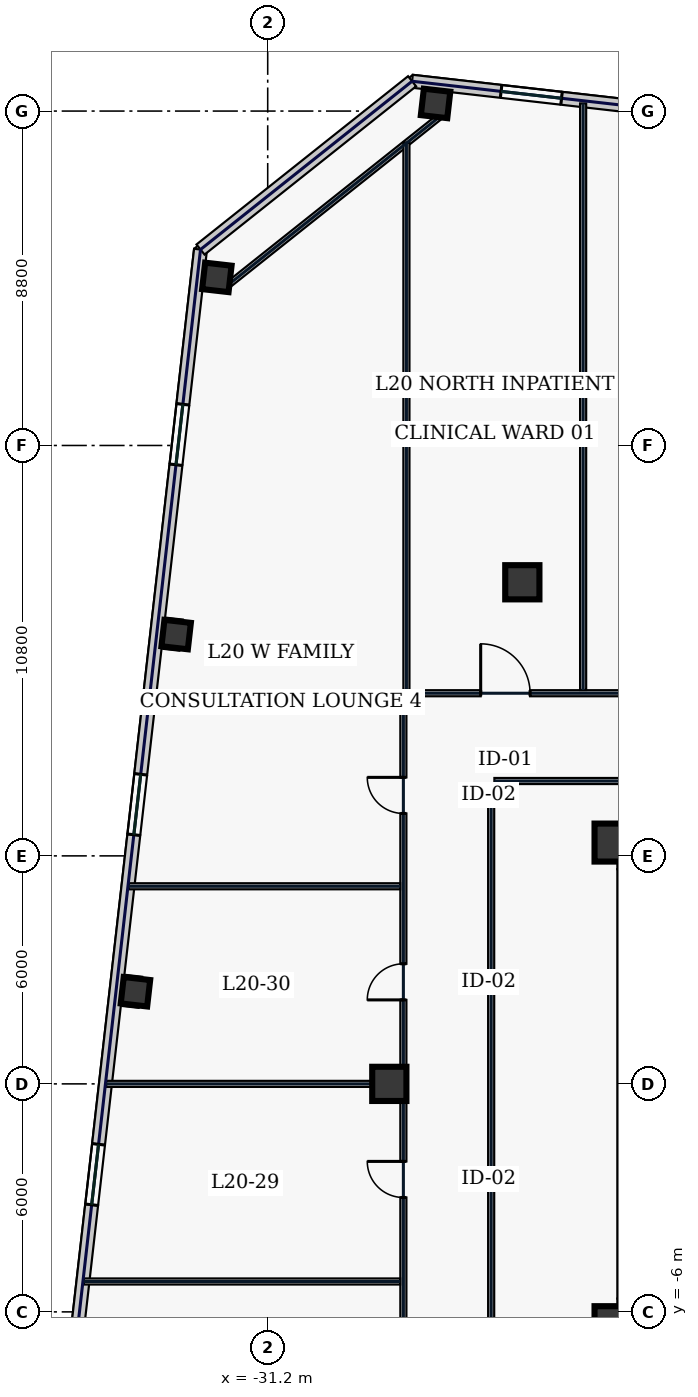
"""IFC4 building model, lengths in metres.
Left out: names, types, materials, properties, quantities, classifications, styles, units other than length and angle.
Written with IfcOpenShell. Run it as: python <this file> out.ifc"""

import sys

from ifc_helpers import new_model, si_unit, direction, frame, frame_2d, origin, origin_2d, place, context, subcontext, project, spatial, rectangle, hollow_rectangle, extrude, element, fill, save


model = new_model("IFC4")
c1 = context("Model", 3, precision=1e-05, world=origin(), true_north=direction((0.0, 1.0)))
c2 = subcontext(c1, "Body", "Model", "MODEL_VIEW")
j1 = project(units=[si_unit("LENGTHUNIT", "METRE"), si_unit("PLANEANGLEUNIT", "RADIAN")], contexts=[c1])
p1 = place(None, origin())
s1 = spatial("IfcSite", under=j1, at=p1, CompositionType="ELEMENT")
p2 = place(p1, origin())
s2 = spatial("IfcBuilding", under=s1, at=p2, CompositionType="ELEMENT")
p3 = place(p2, frame((0.0, 0.0, 93.4)))
s3 = spatial("IfcBuildingStorey", under=s2, at=p3, CompositionType="ELEMENT", Elevation=93.4)
for number, where, z_axis, x_axis in (
    (1, (-22.0, 6.0, 0.0), (0.0, 0.0, 1.0), (1.0, 0.0, 0.0)),
    (2, (-22.0, -6.0, 0.0), (0.0, 0.0, 1.0), (1.0, 0.0, 0.0)),
):
    element("IfcWall", number, at=place(p3, frame(where, z_axis=z_axis, x_axis=x_axis)), inside=s3, PredefinedType="SHEAR", context=c2, shape_type="SweptSolid", body=[
        extrude(rectangle(XDim=11.55, YDim=0.7, at=frame_2d((5.775, 0.0))), origin(), (0.0, 0.0, 1.0), 3.74),
    ])
p4 = place(p3, frame((-21.6, -5.65, 0.0), z_axis=(0.0, 0.0, 1.0), x_axis=(0.0, 1.0, 0.0)))
e3 = element("IfcWall", 3, at=p4, inside=s3, PredefinedType="SHEAR", context=c2, shape_type="SweptSolid", body=[
    extrude(rectangle(XDim=11.3, YDim=0.8, at=frame_2d((5.65, 0.0))), origin(), (0.0, 0.0, 1.0), 3.74),
])
for number, where, z_axis, x_axis in (
    (4, (-22.1, -6.35, 0.0), (0.0, 0.0, 1.0), (1.0, 0.0, 0.0)),
    (5, (-22.1, 6.35, 0.0), (0.0, 0.0, 1.0), (1.0, 0.0, 0.0)),
):
    element("IfcColumn", number, at=place(p3, frame(where, z_axis=z_axis, x_axis=x_axis)), inside=s3, PredefinedType="COLUMN", context=c2, shape_type="SweptSolid", body=[
        extrude(hollow_rectangle(XDim=1.0, YDim=1.0, WallThickness=0.045, at=origin_2d()), origin(), (0.0, 0.0, 1.0), 3.74),
    ])
for number, where, z_axis, x_axis in (
    (6, (-24.5, 13.2, 0.0), (0.0, 0.0, 1.0), (1.0, 0.0, 0.0)),
    (7, (-28.0, 0.0, 0.0), (0.0, 0.0, 1.0), (1.0, 0.0, 0.0)),
):
    element("IfcColumn", number, at=place(p3, frame(where, z_axis=z_axis, x_axis=x_axis)), inside=s3, PredefinedType="COLUMN", context=c2, shape_type="SweptSolid", body=[
        extrude(hollow_rectangle(XDim=0.9, YDim=0.9, WallThickness=0.04, at=origin_2d()), origin(), (0.0, 0.0, 1.0), 3.74),
    ])
for number, where, z_axis, x_axis in (
    (8, (-26.783, 25.801, 0.0), (0.0, 0.0, 1.0), (0.994, -0.113, 0.0)),
    (9, (-32.538, 21.223, 0.0), (0.0, 0.0, 1.0), (0.994, -0.113, 0.0)),
    (10, (-33.609, 11.824, 0.0), (0.0, 0.0, 1.0), (0.994, -0.113, 0.0)),
    (11, (-34.68, 2.425, 0.0), (0.0, 0.0, 1.0), (0.994, -0.113, 0.0)),
):
    element("IfcColumn", number, at=place(p3, frame(where, z_axis=z_axis, x_axis=x_axis)), inside=s3, PredefinedType="COLUMN", context=c2, shape_type="SweptSolid", body=[
        extrude(hollow_rectangle(XDim=0.7, YDim=0.7, WallThickness=0.032, at=origin_2d()), origin(), (0.0, 0.0, 1.0), 3.74),
    ])
p5 = place(p3, frame((-6.314, 23.982, 0.0), z_axis=(0.0, 0.0, 1.0), x_axis=(-0.993571362037, 0.113207546299, 0.0)))
e12 = element("IfcWall", 12, at=p5, inside=s3, PredefinedType="STANDARD", context=c2, shape_type="SweptSolid", body=[
    extrude(rectangle(XDim=21.223, YDim=0.34, at=frame_2d((10.611, 0.0))), origin(), (0.0, 0.0, 1.0), 3.74),
])
p6 = place(p5, frame((17.265, 0.0, 0.22)))
e13 = element("IfcOpeningElement", 13, at=p6, cuts=e12, PredefinedType="OPENING", context=c2, shape_type="SweptSolid", body=[
    extrude(rectangle(XDim=1.6, YDim=1.2, at=frame_2d((0.8, 0.6))), frame((0.0, 0.18, 0.0), z_axis=(0.0, -1.0, 0.0), x_axis=(1.0, 0.0, 0.0)), (0.0, 0.0, 1.0), 0.36),
])
p7 = place(p5, frame((12.794, 0.0, 0.67)))
e14 = element("IfcOpeningElement", 14, at=p7, cuts=e12, PredefinedType="OPENING", context=c2, shape_type="SweptSolid", body=[
    extrude(rectangle(XDim=2.1, YDim=2.2, at=frame_2d((1.05, 1.1))), frame((0.0, 0.18, 0.0), z_axis=(0.0, -1.0, 0.0), x_axis=(1.0, 0.0, 0.0)), (0.0, 0.0, 1.0), 0.36),
])
p8 = place(p5, frame((4.866, 0.0, 0.67)))
e15 = element("IfcOpeningElement", 15, at=p8, cuts=e12, PredefinedType="OPENING", context=c2, shape_type="SweptSolid", body=[
    extrude(rectangle(XDim=0.85, YDim=1.85, at=frame_2d((0.425, 0.925))), frame((0.0, 0.18, 0.0), z_axis=(0.0, -1.0, 0.0), x_axis=(1.0, 0.0, 0.0)), (0.0, 0.0, 1.0), 0.36),
])
p9 = place(p3, frame((-32.968, 21.957, 0.0), z_axis=(0.0, 0.0, 1.0), x_axis=(-0.113201605824, -0.993572038877, 0.0)))
e16 = element("IfcWall", 16, at=p9, inside=s3, PredefinedType="STANDARD", context=c2, shape_type="SweptSolid", body=[
    extrude(rectangle(XDim=39.2, YDim=0.34, at=frame_2d((19.6, 0.0))), origin(), (0.0, 0.0, 1.0), 3.74),
])
p10 = place(p9, frame((4.1, 0.0, 0.58)))
e17 = element("IfcOpeningElement", 17, at=p10, cuts=e16, PredefinedType="OPENING", context=c2, shape_type="SweptSolid", body=[
    extrude(rectangle(XDim=1.6, YDim=2.3, at=frame_2d((0.8, 1.15))), frame((0.0, 0.18, 0.0), z_axis=(0.0, -1.0, 0.0), x_axis=(1.0, 0.0, 0.0)), (0.0, 0.0, 1.0), 0.36),
])
p11 = place(p9, frame((13.9, 0.0, 0.58)))
e18 = element("IfcOpeningElement", 18, at=p11, cuts=e16, PredefinedType="OPENING", context=c2, shape_type="SweptSolid", body=[
    extrude(rectangle(XDim=1.6, YDim=2.3, at=frame_2d((0.8, 1.15))), frame((0.0, 0.18, 0.0), z_axis=(0.0, -1.0, 0.0), x_axis=(1.0, 0.0, 0.0)), (0.0, 0.0, 1.0), 0.36),
])
p12 = place(p9, frame((23.7, 0.0, 0.58)))
e19 = element("IfcOpeningElement", 19, at=p12, cuts=e16, PredefinedType="OPENING", context=c2, shape_type="SweptSolid", body=[
    extrude(rectangle(XDim=1.6, YDim=2.3, at=frame_2d((0.8, 1.15))), frame((0.0, 0.18, 0.0), z_axis=(0.0, -1.0, 0.0), x_axis=(1.0, 0.0, 0.0)), (0.0, 0.0, 1.0), 0.36),
])
p13 = place(p9, frame((33.5, 0.0, 0.58)))
e20 = element("IfcOpeningElement", 20, at=p13, cuts=e16, PredefinedType="OPENING", context=c2, shape_type="SweptSolid", body=[
    extrude(rectangle(XDim=1.6, YDim=2.3, at=frame_2d((0.8, 1.15))), frame((0.0, 0.18, 0.0), z_axis=(0.0, -1.0, 0.0), x_axis=(1.0, 0.0, 0.0)), (0.0, 0.0, 1.0), 0.36),
])
p14 = place(p3, frame((-27.401, 26.385, 0.0), z_axis=(0.0, 0.0, 1.0), x_axis=(-0.78261359446, -0.622507800567, 0.0)))
e21 = element("IfcWall", 21, at=p14, inside=s3, PredefinedType="STANDARD", context=c2, shape_type="SweptSolid", body=[
    extrude(rectangle(XDim=7.114, YDim=0.34, at=frame_2d((3.557, 0.0))), origin(), (0.0, 0.0, 1.0), 3.74),
])
p15 = place(p3, frame((-26.571, 25.535, 0.0), z_axis=(0.0, 0.0, 1.0), x_axis=(-0.782617962887, -0.622502308564, 0.0)))
e22 = element("IfcWall", 22, at=p15, inside=s3, PredefinedType="PARTITIONING", context=c2, shape_type="SweptSolid", body=[
    extrude(rectangle(XDim=7.354, YDim=0.16, at=frame_2d((3.677, 0.0))), origin(), (0.0, 0.0, 1.0), 3.74),
])
p16 = place(p3, frame((-27.63, -10.015, 0.0), z_axis=(0.0, 0.0, 1.0), x_axis=(0.0, 1.0, 0.0)))
e23 = element("IfcWall", 23, at=p16, inside=s3, PredefinedType="PARTITIONING", context=c2, shape_type="SweptSolid", body=[
    extrude(rectangle(XDim=20.13, YDim=0.16, at=frame_2d((10.065, 0.0))), origin(), (0.0, 0.0, 1.0), 3.74),
])
p17 = place(p16, frame((2.169, 0.0, 0.0)))
e24 = element("IfcOpeningElement", 24, at=p17, cuts=e23, PredefinedType="OPENING", context=c2, shape_type="SweptSolid", body=[
    extrude(rectangle(XDim=0.95, YDim=2.2, at=frame_2d((0.475, 1.1))), frame((0.0, 0.09, 0.0), z_axis=(0.0, -1.0, 0.0), x_axis=(1.0, 0.0, 0.0)), (0.0, 0.0, 1.0), 0.18),
])
p18 = place(p16, frame((7.025, 0.0, 0.0)))
e25 = element("IfcOpeningElement", 25, at=p18, cuts=e23, PredefinedType="OPENING", context=c2, shape_type="SweptSolid", body=[
    extrude(rectangle(XDim=0.95, YDim=2.2, at=frame_2d((0.475, 1.1))), frame((0.0, 0.09, 0.0), z_axis=(0.0, -1.0, 0.0), x_axis=(1.0, 0.0, 0.0)), (0.0, 0.0, 1.0), 0.18),
])
p19 = place(p16, frame((12.225, 0.0, 0.0)))
e26 = element("IfcOpeningElement", 26, at=p19, cuts=e23, PredefinedType="OPENING", context=c2, shape_type="SweptSolid", body=[
    extrude(rectangle(XDim=0.95, YDim=2.2, at=frame_2d((0.475, 1.1))), frame((0.0, 0.09, 0.0), z_axis=(0.0, -1.0, 0.0), x_axis=(1.0, 0.0, 0.0)), (0.0, 0.0, 1.0), 0.18),
])
p20 = place(p16, frame((17.131, 0.0, 0.0)))
e27 = element("IfcOpeningElement", 27, at=p20, cuts=e23, PredefinedType="OPENING", context=c2, shape_type="SweptSolid", body=[
    extrude(rectangle(XDim=0.95, YDim=2.2, at=frame_2d((0.475, 1.1))), frame((0.0, 0.09, 0.0), z_axis=(0.0, -1.0, 0.0), x_axis=(1.0, 0.0, 0.0)), (0.0, 0.0, 1.0), 0.18),
])
p21 = place(p3, frame((-27.465, 10.28, 0.0), z_axis=(0.0, 0.0, 1.0), x_axis=(1.0, 0.0, 0.0)))
e28 = element("IfcWall", 28, at=p21, inside=s3, PredefinedType="PARTITIONING", context=c2, shape_type="SweptSolid", body=[
    extrude(rectangle(XDim=54.93, YDim=0.16, at=frame_2d((27.465, 0.0))), origin(), (0.0, 0.0, 1.0), 3.74),
])
p22 = place(p21, frame((1.869, 0.0, 0.0)))
e29 = element("IfcOpeningElement", 29, at=p22, cuts=e28, PredefinedType="OPENING", context=c2, shape_type="SweptSolid", body=[
    extrude(rectangle(XDim=1.3, YDim=2.2, at=frame_2d((0.65, 1.1))), frame((0.0, 0.09, 0.0), z_axis=(0.0, -1.0, 0.0), x_axis=(1.0, 0.0, 0.0)), (0.0, 0.0, 1.0), 0.18),
])
p23 = place(p21, frame((8.08, 0.0, 0.0)))
e30 = element("IfcOpeningElement", 30, at=p23, cuts=e28, PredefinedType="OPENING", context=c2, shape_type="SweptSolid", body=[
    extrude(rectangle(XDim=0.95, YDim=2.2, at=frame_2d((0.475, 1.1))), frame((0.0, 0.09, 0.0), z_axis=(0.0, -1.0, 0.0), x_axis=(1.0, 0.0, 0.0)), (0.0, 0.0, 1.0), 0.18),
])
p24 = place(p21, frame((14.555, 0.0, 0.0)))
e31 = element("IfcOpeningElement", 31, at=p24, cuts=e28, PredefinedType="OPENING", context=c2, shape_type="SweptSolid", body=[
    extrude(rectangle(XDim=1.3, YDim=2.2, at=frame_2d((0.65, 1.1))), frame((0.0, 0.09, 0.0), z_axis=(0.0, -1.0, 0.0), x_axis=(1.0, 0.0, 0.0)), (0.0, 0.0, 1.0), 0.18),
])
p25 = place(p21, frame((21.2, 0.0, 0.0)))
e32 = element("IfcOpeningElement", 32, at=p25, cuts=e28, PredefinedType="OPENING", context=c2, shape_type="SweptSolid", body=[
    extrude(rectangle(XDim=0.95, YDim=2.2, at=frame_2d((0.475, 1.1))), frame((0.0, 0.09, 0.0), z_axis=(0.0, -1.0, 0.0), x_axis=(1.0, 0.0, 0.0)), (0.0, 0.0, 1.0), 0.18),
])
p26 = place(p21, frame((28.2, 0.0, 0.0)))
e33 = element("IfcOpeningElement", 33, at=p26, cuts=e28, PredefinedType="OPENING", context=c2, shape_type="SweptSolid", body=[
    extrude(rectangle(XDim=1.05, YDim=2.2, at=frame_2d((0.525, 1.1))), frame((0.0, 0.09, 0.0), z_axis=(0.0, -1.0, 0.0), x_axis=(1.0, 0.0, 0.0)), (0.0, 0.0, 1.0), 0.18),
])
p27 = place(p21, frame((37.875, 0.0, 0.0)))
e34 = element("IfcOpeningElement", 34, at=p27, cuts=e28, PredefinedType="OPENING", context=c2, shape_type="SweptSolid", body=[
    extrude(rectangle(XDim=0.95, YDim=2.2, at=frame_2d((0.475, 1.1))), frame((0.0, 0.09, 0.0), z_axis=(0.0, -1.0, 0.0), x_axis=(1.0, 0.0, 0.0)), (0.0, 0.0, 1.0), 0.18),
])
p28 = place(p21, frame((46.95, 0.0, 0.0)))
e35 = element("IfcOpeningElement", 35, at=p28, cuts=e28, PredefinedType="OPENING", context=c2, shape_type="SweptSolid", body=[
    extrude(rectangle(XDim=1.3, YDim=2.2, at=frame_2d((0.65, 1.1))), frame((0.0, 0.09, 0.0), z_axis=(0.0, -1.0, 0.0), x_axis=(1.0, 0.0, 0.0)), (0.0, 0.0, 1.0), 0.18),
])
p29 = place(p21, frame((52.106, 0.0, 0.0)))
e36 = element("IfcOpeningElement", 36, at=p29, cuts=e28, PredefinedType="OPENING", context=c2, shape_type="SweptSolid", body=[
    extrude(rectangle(XDim=0.95, YDim=2.2, at=frame_2d((0.475, 1.1))), frame((0.0, 0.09, 0.0), z_axis=(0.0, -1.0, 0.0), x_axis=(1.0, 0.0, 0.0)), (0.0, 0.0, 1.0), 0.18),
])
p30 = place(p3, frame((-10.665, 7.97, 0.0), z_axis=(0.0, 0.0, 1.0), x_axis=(-1.0, 0.0, 0.0)))
e37 = element("IfcWall", 37, at=p30, inside=s3, PredefinedType="PARTITIONING", context=c2, shape_type="SweptSolid", body=[
    extrude(rectangle(XDim=14.57, YDim=0.16, at=frame_2d((7.285, 0.0))), origin(), (0.0, 0.0, 1.0), 3.74),
])
p31 = place(p3, frame((-25.32, 7.885, 0.0), z_axis=(0.0, 0.0, 1.0), x_axis=(0.0, -1.0, 0.0)))
e38 = element("IfcWall", 38, at=p31, inside=s3, PredefinedType="PARTITIONING", context=c2, shape_type="SweptSolid", body=[
    extrude(rectangle(XDim=15.67, YDim=0.16, at=frame_2d((7.835, 0.0))), origin(), (0.0, 0.0, 1.0), 3.74),
])
p32 = place(p3, frame((-27.55, 10.365, 0.0), z_axis=(0.0, 0.0, 1.0), x_axis=(0.0, 1.0, 0.0)))
e39 = element("IfcWall", 39, at=p32, inside=s3, PredefinedType="PARTITIONING", context=c2, shape_type="SweptSolid", body=[
    extrude(rectangle(XDim=14.409, YDim=0.16, at=frame_2d((7.204, 0.0))), origin(), (0.0, 0.0, 1.0), 3.74),
])
p33 = place(p3, frame((-22.9, 10.365, 0.0), z_axis=(0.0, 0.0, 1.0), x_axis=(0.0, 1.0, 0.0)))
e40 = element("IfcWall", 40, at=p33, inside=s3, PredefinedType="PARTITIONING", context=c2, shape_type="SweptSolid", body=[
    extrude(rectangle(XDim=15.437, YDim=0.16, at=frame_2d((7.718, 0.0))), origin(), (0.0, 0.0, 1.0), 3.74),
])
p34 = place(p3, frame((-36.042, -5.2, 0.0), z_axis=(0.0, 0.0, 1.0), x_axis=(1.0, 0.0, 0.0)))
e41 = element("IfcWall", 41, at=p34, inside=s3, PredefinedType="PARTITIONING", context=c2, shape_type="SweptSolid", body=[
    extrude(rectangle(XDim=8.327, YDim=0.16, at=frame_2d((4.164, 0.0))), origin(), (0.0, 0.0, 1.0), 3.74),
])
p35 = place(p3, frame((-35.449, 0.0, 0.0), z_axis=(0.0, 0.0, 1.0), x_axis=(1.0, 0.0, 0.0)))
e42 = element("IfcWall", 42, at=p35, inside=s3, PredefinedType="PARTITIONING", context=c2, shape_type="SweptSolid", body=[
    extrude(rectangle(XDim=7.734, YDim=0.16, at=frame_2d((3.867, 0.0))), origin(), (0.0, 0.0, 1.0), 3.74),
])
p36 = place(p3, frame((-34.857, 5.2, 0.0), z_axis=(0.0, 0.0, 1.0), x_axis=(1.0, 0.0, 0.0)))
e43 = element("IfcWall", 43, at=p36, inside=s3, PredefinedType="PARTITIONING", context=c2, shape_type="SweptSolid", body=[
    extrude(rectangle(XDim=7.142, YDim=0.16, at=frame_2d((3.571, 0.0))), origin(), (0.0, 0.0, 1.0), 3.74),
])
p37 = place(p6, origin())
e44 = element("IfcWindow", 44, at=p37, inside=s3, PartitioningType="SINGLE_PANEL", PredefinedType="WINDOW", context=c2, shape_type="SweptSolid", body=[
    extrude(rectangle(XDim=1.6, YDim=1.2, at=frame_2d((0.8, 0.6))), frame((0.0, 0.03, 0.0), z_axis=(0.0, -1.0, 0.0), x_axis=(1.0, 0.0, 0.0)), (0.0, 0.0, 1.0), 0.06),
])
fill(e13, e44)
p38 = place(p10, origin())
e45 = element("IfcWindow", 45, at=p38, inside=s3, PartitioningType="SINGLE_PANEL", PredefinedType="WINDOW", context=c2, shape_type="SweptSolid", body=[
    extrude(rectangle(XDim=1.6, YDim=2.3, at=frame_2d((0.8, 1.15))), frame((0.0, 0.03, 0.0), z_axis=(0.0, -1.0, 0.0), x_axis=(1.0, 0.0, 0.0)), (0.0, 0.0, 1.0), 0.06),
])
fill(e17, e45)
p39 = place(p11, origin())
e46 = element("IfcWindow", 46, at=p39, inside=s3, PartitioningType="SINGLE_PANEL", PredefinedType="WINDOW", context=c2, shape_type="SweptSolid", body=[
    extrude(rectangle(XDim=1.6, YDim=2.3, at=frame_2d((0.8, 1.15))), frame((0.0, 0.03, 0.0), z_axis=(0.0, -1.0, 0.0), x_axis=(1.0, 0.0, 0.0)), (0.0, 0.0, 1.0), 0.06),
])
fill(e18, e46)
p40 = place(p12, origin())
e47 = element("IfcWindow", 47, at=p40, inside=s3, PartitioningType="SINGLE_PANEL", PredefinedType="WINDOW", context=c2, shape_type="SweptSolid", body=[
    extrude(rectangle(XDim=1.6, YDim=2.3, at=frame_2d((0.8, 1.15))), frame((0.0, 0.03, 0.0), z_axis=(0.0, -1.0, 0.0), x_axis=(1.0, 0.0, 0.0)), (0.0, 0.0, 1.0), 0.06),
])
fill(e19, e47)
p41 = place(p22, origin())
e48 = element("IfcDoor", 48, at=p41, inside=s3, OperationType="SINGLE_SWING_LEFT", PredefinedType="DOOR", context=c2, shape_type="SweptSolid", body=[
    extrude(rectangle(XDim=1.3, YDim=2.2, at=frame_2d((0.65, 1.1))), frame((0.0, 0.025, 0.0), z_axis=(0.0, -1.0, 0.0), x_axis=(1.0, 0.0, 0.0)), (0.0, 0.0, 1.0), 0.05),
])
fill(e29, e48)
p42 = place(p18, origin())
e49 = element("IfcDoor", 49, at=p42, inside=s3, OperationType="SINGLE_SWING_RIGHT", PredefinedType="DOOR", context=c2, shape_type="SweptSolid", body=[
    extrude(rectangle(XDim=0.95, YDim=2.2, at=frame_2d((0.475, 1.1))), frame((0.0, 0.025, 0.0), z_axis=(0.0, -1.0, 0.0), x_axis=(1.0, 0.0, 0.0)), (0.0, 0.0, 1.0), 0.05),
])
fill(e25, e49)
p43 = place(p19, origin())
e50 = element("IfcDoor", 50, at=p43, inside=s3, OperationType="SINGLE_SWING_LEFT", PredefinedType="DOOR", context=c2, shape_type="SweptSolid", body=[
    extrude(rectangle(XDim=0.95, YDim=2.2, at=frame_2d((0.475, 1.1))), frame((0.0, 0.025, 0.0), z_axis=(0.0, -1.0, 0.0), x_axis=(1.0, 0.0, 0.0)), (0.0, 0.0, 1.0), 0.05),
])
fill(e26, e50)
p44 = place(p20, origin())
e51 = element("IfcDoor", 51, at=p44, inside=s3, OperationType="SINGLE_SWING_RIGHT", PredefinedType="DOOR", context=c2, shape_type="SweptSolid", body=[
    extrude(rectangle(XDim=0.95, YDim=2.2, at=frame_2d((0.475, 1.1))), frame((0.0, 0.025, 0.0), z_axis=(0.0, -1.0, 0.0), x_axis=(1.0, 0.0, 0.0)), (0.0, 0.0, 1.0), 0.05),
])
fill(e27, e51)
save(model, sys.argv[1])
